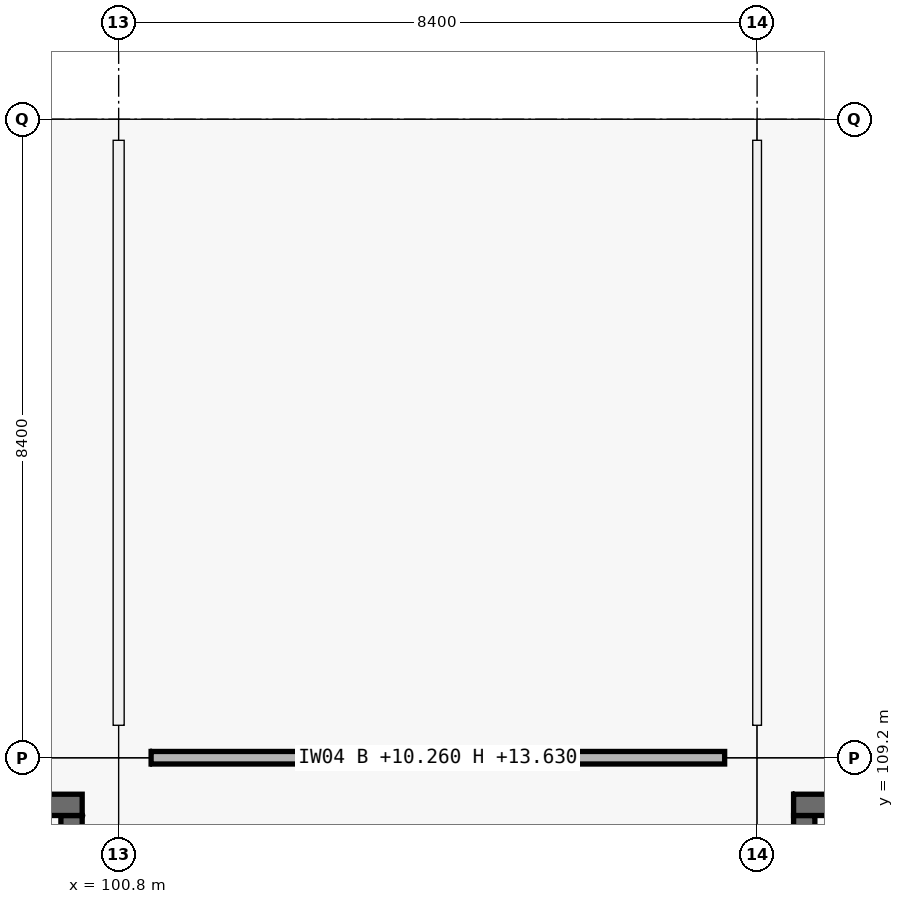
"""IFC4 building model, lengths in metres.
Left out: names, types, materials, properties, quantities, classifications, styles, units other than length and angle.
Written with IfcOpenShell. Run it as: python <this file> out.ifc"""

import sys

from ifc_helpers import new_model, si_unit, direction, frame, frame_2d, origin, origin_2d, place, context, subcontext, project, spatial, rectangle, extrude, element, fill, save


model = new_model("IFC4")
c1 = context("Model", 3, precision=1e-05, world=origin(), true_north=direction((0.0, 1.0)))
c2 = subcontext(c1, "Body", "Model", "MODEL_VIEW")
j1 = project(units=[si_unit("LENGTHUNIT", "METRE"), si_unit("PLANEANGLEUNIT", "RADIAN")], contexts=[c1])
p1 = place(None, origin())
s1 = spatial("IfcSite", under=j1, at=p1, CompositionType="ELEMENT")
p2 = place(p1, origin())
s2 = spatial("IfcBuilding", under=s1, at=p2, CompositionType="ELEMENT")
p3 = place(p2, frame((0.0, 0.0, 10.26)))
s3 = spatial("IfcBuildingStorey", under=s2, at=p3, CompositionType="ELEMENT", Elevation=10.26)
p4 = place(p3, frame((100.8, 109.2, 0.0), z_axis=(0.0, 0.0, 1.0), x_axis=(1.0, 0.0, 0.0)))
e1 = element("IfcColumn", 1, at=p4, inside=s3, PredefinedType="COLUMN", context=c2, shape_type="SweptSolid", body=[
    extrude(rectangle(XDim=0.85, YDim=0.85, at=origin_2d()), origin(), (0.0, 0.0, 1.0), 4.5),
])
p5 = place(p3, frame((100.8, 117.6, 0.0), z_axis=(0.0, 0.0, 1.0), x_axis=(1.0, 0.0, 0.0)))
e2 = element("IfcColumn", 2, at=p5, inside=s3, PredefinedType="COLUMN", context=c2, shape_type="SweptSolid", body=[
    extrude(rectangle(XDim=0.8, YDim=0.55, at=origin_2d()), origin(), (0.0, 0.0, 1.0), 4.5),
])
p6 = place(p3, frame((109.2, 109.2, 0.0), z_axis=(0.0, 0.0, 1.0), x_axis=(1.0, 0.0, 0.0)))
e3 = element("IfcColumn", 3, at=p6, inside=s3, PredefinedType="COLUMN", context=c2, shape_type="SweptSolid", body=[
    extrude(rectangle(XDim=0.85, YDim=0.85, at=origin_2d()), origin(), (0.0, 0.0, 1.0), 4.5),
])
p7 = place(p3, frame((109.2, 117.6, 0.0), z_axis=(0.0, 0.0, 1.0), x_axis=(1.0, 0.0, 0.0)))
e4 = element("IfcColumn", 4, at=p7, inside=s3, PredefinedType="COLUMN", context=c2, shape_type="SweptSolid", body=[
    extrude(rectangle(XDim=0.8, YDim=0.55, at=origin_2d()), origin(), (0.0, 0.0, 1.0), 4.5),
])
p8 = place(p3, frame((109.82, 101.56, 0.0), z_axis=(0.0, 0.0, 1.0), x_axis=(0.0, 1.0, 0.0)))
e5 = element("IfcWall", 5, at=p8, inside=s3, PredefinedType="SHEAR", context=c2, shape_type="SweptSolid", body=[
    extrude(rectangle(XDim=6.88, YDim=0.28, at=frame_2d((3.44, 0.0))), origin(), (0.0, 0.0, 1.0), 4.5),
])
for number, where, z_axis, x_axis in (
    (6, (109.68, 108.58, 0.0), (0.0, 0.0, 1.0), (1.0, 0.0, 0.0)),
    (7, (92.88, 108.58, 0.0), (0.0, 0.0, 1.0), (1.0, 0.0, 0.0)),
):
    element("IfcWall", number, at=place(p3, frame(where, z_axis=z_axis, x_axis=x_axis)), inside=s3, PredefinedType="SHEAR", context=c2, shape_type="SweptSolid", body=[
        extrude(rectangle(XDim=7.44, YDim=0.28, at=frame_2d((3.72, 0.0))), origin(), (0.0, 0.0, 1.0), 4.5),
    ])
p9 = place(p3, frame((100.18, 108.44, 0.0), z_axis=(0.0, 0.0, 1.0), x_axis=(0.0, -1.0, 0.0)))
e8 = element("IfcWall", 8, at=p9, inside=s3, PredefinedType="SHEAR", context=c2, shape_type="SweptSolid", body=[
    extrude(rectangle(XDim=6.88, YDim=0.28, at=frame_2d((3.44, 0.0))), origin(), (0.0, 0.0, 1.0), 4.5),
])
p10 = place(p9, frame((3.99, 0.0, 0.0)))
e9 = element("IfcOpeningElement", 9, at=p10, cuts=e8, PredefinedType="OPENING", context=c2, shape_type="SweptSolid", body=[
    extrude(rectangle(XDim=1.5, YDim=2.15, at=frame_2d((0.75, 1.075))), frame((0.0, 0.14, 0.0), z_axis=(0.0, -1.0, 0.0), x_axis=(1.0, 0.0, 0.0)), (0.0, 0.0, 1.0), 0.28),
])
p11 = place(p3, frame((101.227, 109.2, 0.0), z_axis=(0.0, 0.0, 1.0), x_axis=(1.0, 0.0, 0.0)))
e10 = element("IfcWall", 10, at=p11, inside=s3, PredefinedType="PARTITIONING", context=c2, shape_type="SweptSolid", body=[
    extrude(rectangle(XDim=7.546, YDim=0.165, at=frame_2d((3.773, 0.0))), origin(), (0.0, 0.0, 1.0), 3.37),
])
p12 = place(p11, frame((3.273, 0.0, 0.0)))
e11 = element("IfcOpeningElement", 11, at=p12, cuts=e10, PredefinedType="OPENING", context=c2, shape_type="SweptSolid", body=[
    extrude(rectangle(XDim=1.0, YDim=2.2, at=frame_2d((0.5, 1.1))), frame((0.0, 0.083, 0.0), z_axis=(0.0, -1.0, 0.0), x_axis=(1.0, 0.0, 0.0)), (0.0, 0.0, 1.0), 0.165),
])
p13 = place(p3, frame((100.8, 109.627, 0.0), z_axis=(0.0, 0.0, 1.0), x_axis=(0.0, 1.0, 0.0)))
e12 = element("IfcWall", 12, at=p13, inside=s3, PredefinedType="PARTITIONING", context=c2, shape_type="SweptSolid", body=[
    extrude(rectangle(XDim=7.696, YDim=0.145, at=frame_2d((3.848, 0.0))), origin(), (0.0, 0.0, 1.0), 3.37),
])
p14 = place(p13, frame((3.388, 0.0, 0.0)))
e13 = element("IfcOpeningElement", 13, at=p14, cuts=e12, PredefinedType="OPENING", context=c2, shape_type="SweptSolid", body=[
    extrude(rectangle(XDim=0.92, YDim=2.15, at=frame_2d((0.46, 1.075))), frame((0.0, 0.073, 0.0), z_axis=(0.0, -1.0, 0.0), x_axis=(1.0, 0.0, 0.0)), (0.0, 0.0, 1.0), 0.145),
])
p15 = place(p3, frame((109.2, 109.627, 0.0), z_axis=(0.0, 0.0, 1.0), x_axis=(0.0, 1.0, 0.0)))
e14 = element("IfcWall", 14, at=p15, inside=s3, PredefinedType="PARTITIONING", context=c2, shape_type="SweptSolid", body=[
    extrude(rectangle(XDim=7.696, YDim=0.115, at=frame_2d((3.848, 0.0))), origin(), (0.0, 0.0, 1.0), 3.37),
])
p16 = place(p15, frame((3.383, 0.0, 0.0)))
e15 = element("IfcOpeningElement", 15, at=p16, cuts=e14, PredefinedType="OPENING", context=c2, shape_type="SweptSolid", body=[
    extrude(rectangle(XDim=0.93, YDim=2.12, at=frame_2d((0.465, 1.06))), frame((0.0, 0.058, 0.0), z_axis=(0.0, -1.0, 0.0), x_axis=(1.0, 0.0, 0.0)), (0.0, 0.0, 1.0), 0.115),
])
p17 = place(p12, origin())
e16 = element("IfcDoor", 16, at=p17, inside=s3, OperationType="SINGLE_SWING_RIGHT", PredefinedType="DOOR", context=c2, shape_type="SweptSolid", body=[
    extrude(rectangle(XDim=1.0, YDim=2.2, at=frame_2d((0.5, 1.1))), frame((0.0, 0.025, 0.0), z_axis=(0.0, -1.0, 0.0), x_axis=(1.0, 0.0, 0.0)), (0.0, 0.0, 1.0), 0.05),
])
fill(e11, e16)
p18 = place(p16, origin())
e17 = element("IfcDoor", 17, at=p18, inside=s3, OperationType="SINGLE_SWING_RIGHT", PredefinedType="DOOR", context=c2, shape_type="SweptSolid", body=[
    extrude(rectangle(XDim=0.93, YDim=2.12, at=frame_2d((0.465, 1.06))), frame((0.0, 0.025, 0.0), z_axis=(0.0, -1.0, 0.0), x_axis=(1.0, 0.0, 0.0)), (0.0, 0.0, 1.0), 0.05),
])
fill(e15, e17)
p19 = place(p14, origin())
e18 = element("IfcDoor", 18, at=p19, inside=s3, OperationType="SINGLE_SWING_RIGHT", PredefinedType="DOOR", context=c2, shape_type="SweptSolid", body=[
    extrude(rectangle(XDim=0.92, YDim=2.15, at=frame_2d((0.46, 1.075))), frame((0.0, 0.025, 0.0), z_axis=(0.0, -1.0, 0.0), x_axis=(1.0, 0.0, 0.0)), (0.0, 0.0, 1.0), 0.05),
])
fill(e13, e18)
save(model, sys.argv[1])
